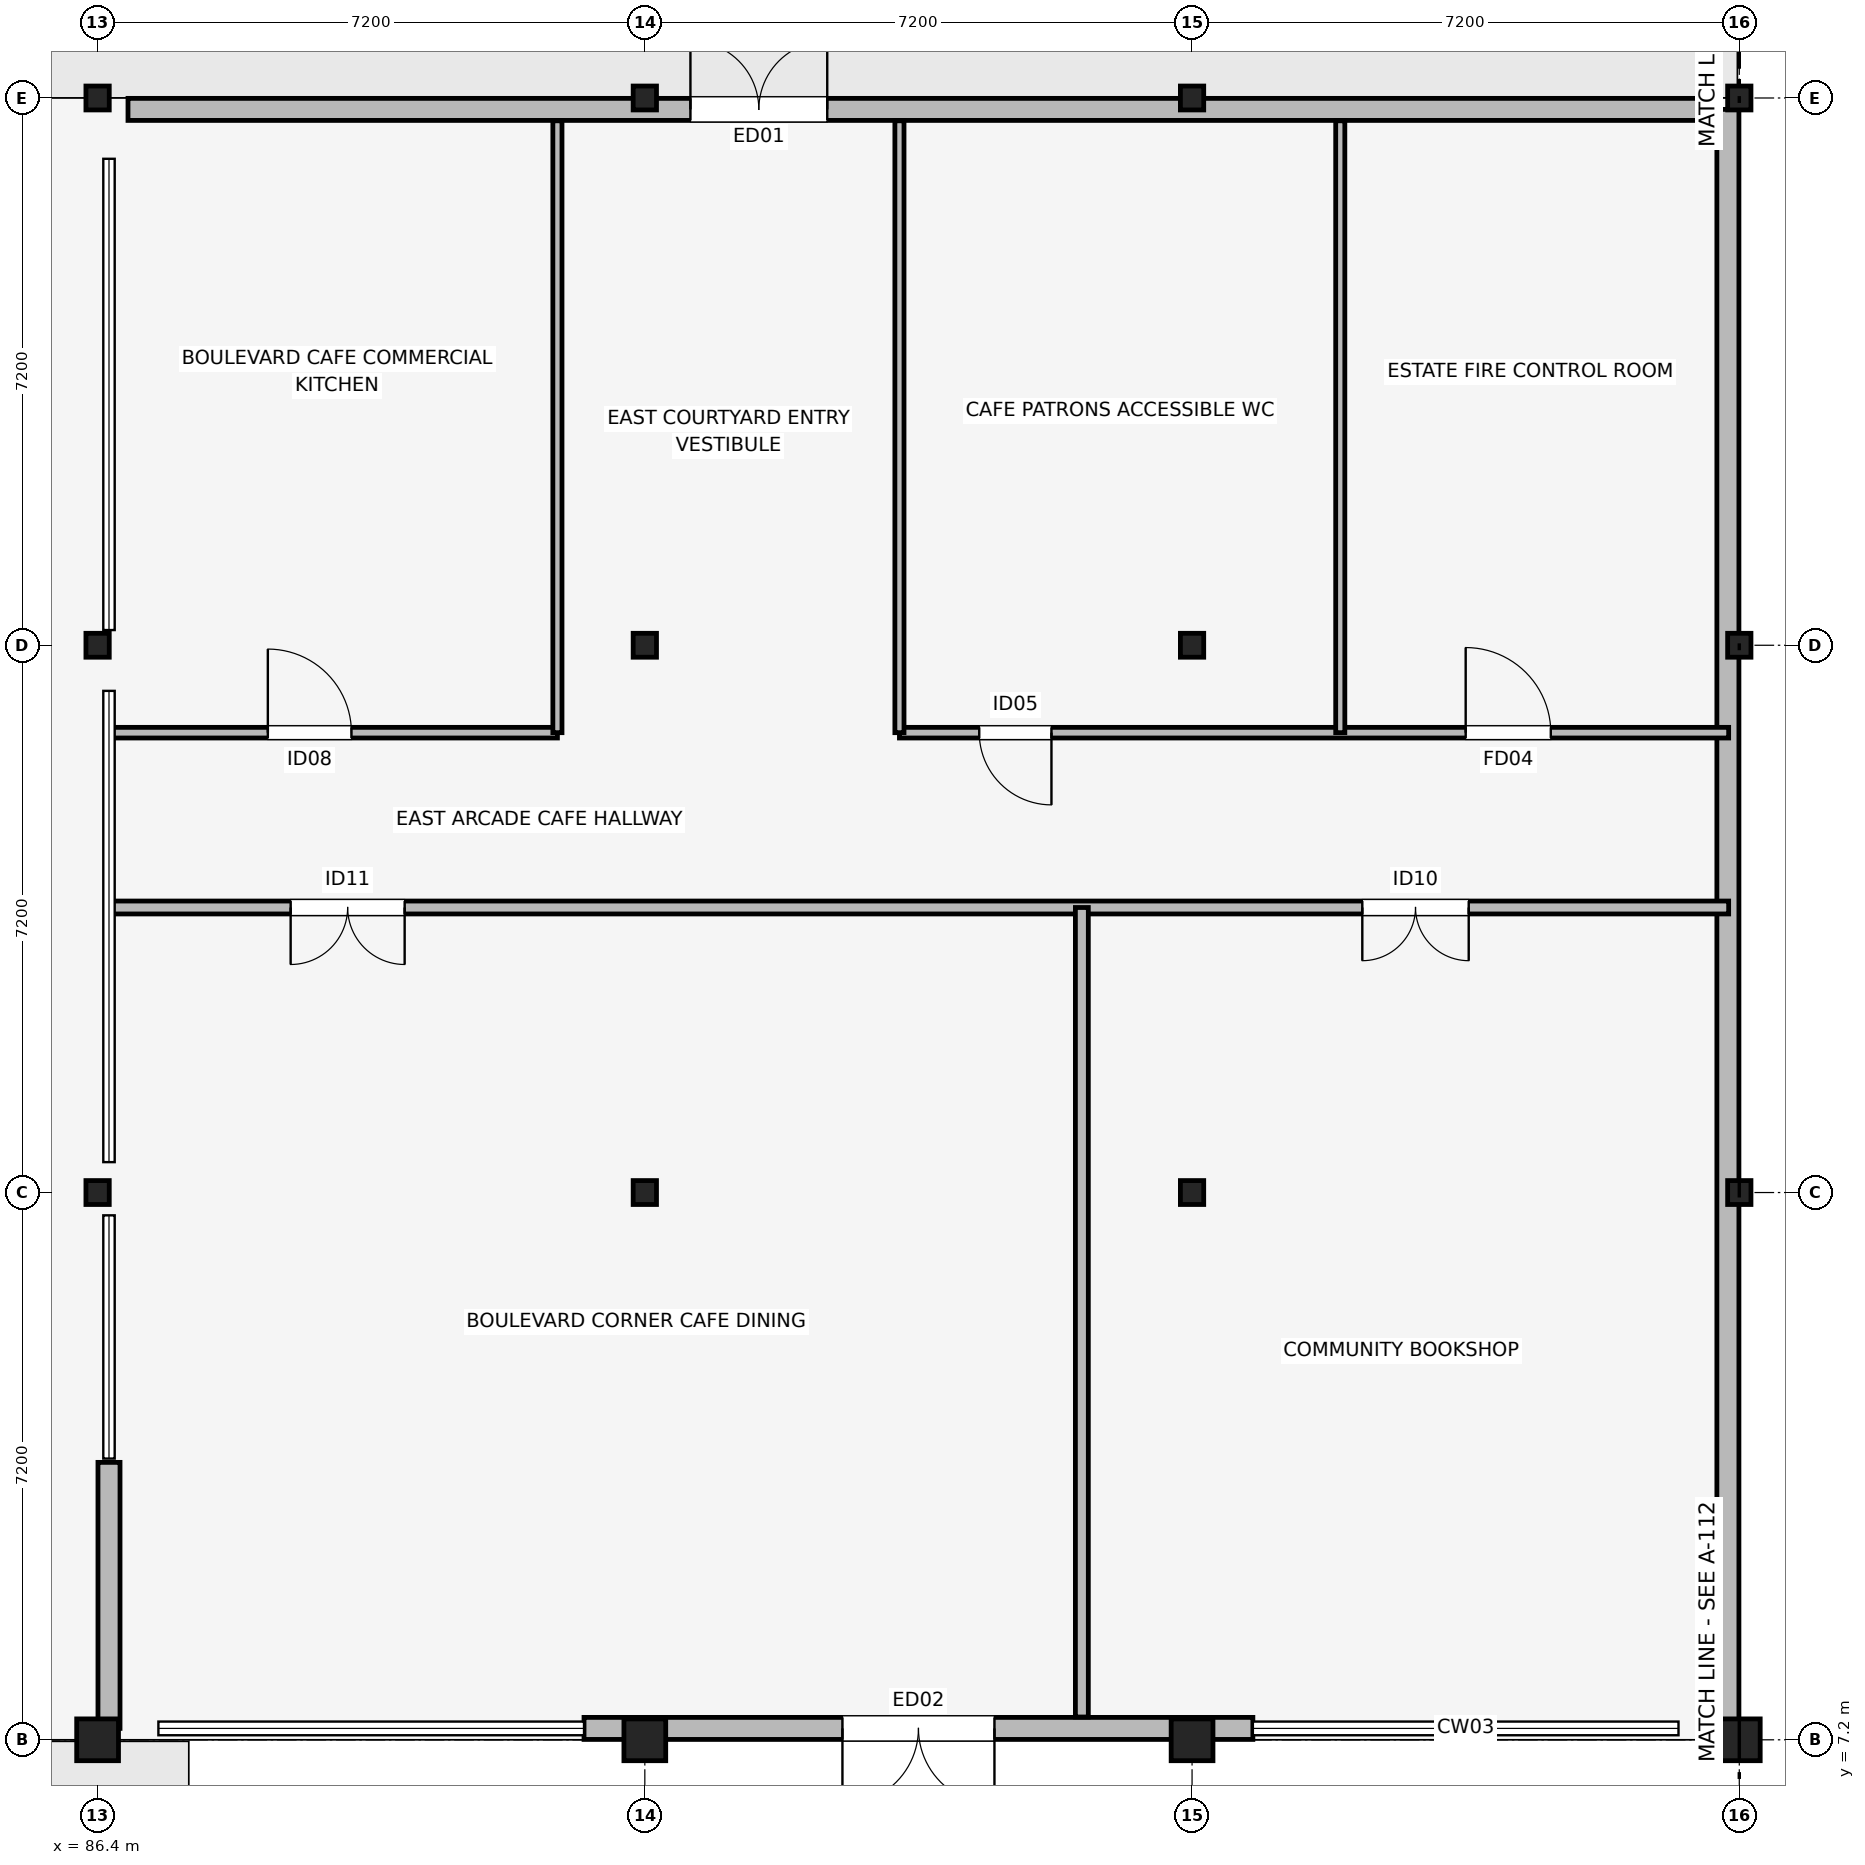
"""IFC4 building model, lengths in metres.
Left out: names, types, materials, properties, quantities, classifications, styles, units other than length and angle.
Written with IfcOpenShell. Run it as: python <this file> out.ifc"""

import sys

from ifc_helpers import new_model, si_unit, direction, frame, frame_2d, origin, origin_2d, place, context, subcontext, project, spatial, rectangle, circle, i_section, extrude, element, fill, save


model = new_model("IFC4")
c1 = context("Model", 3, precision=1e-05, world=origin(), true_north=direction((0.0, 1.0)))
c2 = subcontext(c1, "Body", "Model", "MODEL_VIEW")
j1 = project(units=[si_unit("LENGTHUNIT", "METRE"), si_unit("PLANEANGLEUNIT", "RADIAN")], contexts=[c1])
p1 = place(None, origin())
s1 = spatial("IfcSite", under=j1, at=p1, CompositionType="ELEMENT")
p2 = place(p1, origin())
s2 = spatial("IfcBuilding", under=s1, at=p2, CompositionType="ELEMENT")
p3 = place(p2, origin())
s3 = spatial("IfcBuildingStorey", under=s2, at=p3, CompositionType="ELEMENT", Elevation=0.0)
p4 = place(p3, frame((86.4, 7.2, 0.0), z_axis=(0.0, 0.0, 1.0), x_axis=(1.0, 0.0, 0.0)))
e1 = element("IfcColumn", 1, at=p4, inside=s3, PredefinedType="COLUMN", context=c2, shape_type="SweptSolid", body=[
    extrude(circle(Radius=0.275, at=origin_2d()), origin(), (0.0, 0.0, 1.0), 4.5),
])
for number, where, z_axis, x_axis in (
    (2, (86.4, 14.4, 0.0), (0.0, 0.0, 1.0), (1.0, 0.0, 0.0)),
    (3, (86.4, 21.6, 0.0), (0.0, 0.0, 1.0), (1.0, 0.0, 0.0)),
    (4, (86.4, 28.8, 0.0), (0.0, 0.0, 1.0), (1.0, 0.0, 0.0)),
):
    element("IfcColumn", number, at=place(p3, frame(where, z_axis=z_axis, x_axis=x_axis)), inside=s3, PredefinedType="COLUMN", context=c2, shape_type="SweptSolid", body=[
        extrude(i_section(OverallWidth=0.307, OverallDepth=0.315, WebThickness=0.012, FlangeThickness=0.019, FilletRadius=0.017, at=origin_2d()), origin(), (0.0, 0.0, 1.0), 4.5),
    ])
p5 = place(p3, frame((93.6, 7.2, 0.0), z_axis=(0.0, 0.0, 1.0), x_axis=(1.0, 0.0, 0.0)))
e5 = element("IfcColumn", 5, at=p5, inside=s3, PredefinedType="COLUMN", context=c2, shape_type="SweptSolid", body=[
    extrude(circle(Radius=0.275, at=origin_2d()), origin(), (0.0, 0.0, 1.0), 4.5),
])
for number, where, z_axis, x_axis in (
    (6, (93.6, 14.4, 0.0), (0.0, 0.0, 1.0), (1.0, 0.0, 0.0)),
    (7, (93.6, 21.6, 0.0), (0.0, 0.0, 1.0), (1.0, 0.0, 0.0)),
    (8, (93.6, 28.8, 0.0), (0.0, 0.0, 1.0), (1.0, 0.0, 0.0)),
):
    element("IfcColumn", number, at=place(p3, frame(where, z_axis=z_axis, x_axis=x_axis)), inside=s3, PredefinedType="COLUMN", context=c2, shape_type="SweptSolid", body=[
        extrude(i_section(OverallWidth=0.307, OverallDepth=0.315, WebThickness=0.012, FlangeThickness=0.019, FilletRadius=0.017, at=origin_2d()), origin(), (0.0, 0.0, 1.0), 4.5),
    ])
p6 = place(p3, frame((100.8, 7.2, 0.0), z_axis=(0.0, 0.0, 1.0), x_axis=(1.0, 0.0, 0.0)))
e9 = element("IfcColumn", 9, at=p6, inside=s3, PredefinedType="COLUMN", context=c2, shape_type="SweptSolid", body=[
    extrude(circle(Radius=0.275, at=origin_2d()), origin(), (0.0, 0.0, 1.0), 4.5),
])
for number, where, z_axis, x_axis in (
    (10, (100.8, 14.4, 0.0), (0.0, 0.0, 1.0), (1.0, 0.0, 0.0)),
    (11, (100.8, 21.6, 0.0), (0.0, 0.0, 1.0), (1.0, 0.0, 0.0)),
    (12, (100.8, 28.8, 0.0), (0.0, 0.0, 1.0), (1.0, 0.0, 0.0)),
):
    element("IfcColumn", number, at=place(p3, frame(where, z_axis=z_axis, x_axis=x_axis)), inside=s3, PredefinedType="COLUMN", context=c2, shape_type="SweptSolid", body=[
        extrude(i_section(OverallWidth=0.307, OverallDepth=0.315, WebThickness=0.012, FlangeThickness=0.019, FilletRadius=0.017, at=origin_2d()), origin(), (0.0, 0.0, 1.0), 4.5),
    ])
p7 = place(p3, frame((108.0, 7.2, 0.0), z_axis=(0.0, 0.0, 1.0), x_axis=(1.0, 0.0, 0.0)))
e13 = element("IfcColumn", 13, at=p7, inside=s3, PredefinedType="COLUMN", context=c2, shape_type="SweptSolid", body=[
    extrude(circle(Radius=0.275, at=origin_2d()), origin(), (0.0, 0.0, 1.0), 4.5),
])
for number, where, z_axis, x_axis in (
    (14, (108.0, 14.4, 0.0), (0.0, 0.0, 1.0), (1.0, 0.0, 0.0)),
    (15, (108.0, 21.6, 0.0), (0.0, 0.0, 1.0), (1.0, 0.0, 0.0)),
    (16, (108.0, 28.8, 0.0), (0.0, 0.0, 1.0), (1.0, 0.0, 0.0)),
):
    element("IfcColumn", number, at=place(p3, frame(where, z_axis=z_axis, x_axis=x_axis)), inside=s3, PredefinedType="COLUMN", context=c2, shape_type="SweptSolid", body=[
        extrude(i_section(OverallWidth=0.307, OverallDepth=0.315, WebThickness=0.012, FlangeThickness=0.019, FilletRadius=0.017, at=origin_2d()), origin(), (0.0, 0.0, 1.0), 4.5),
    ])
p8 = place(p3, frame((92.8, 7.35, 0.0), z_axis=(0.0, 0.0, 1.0), x_axis=(1.0, 0.0, 0.0)))
e17 = element("IfcWall", 17, at=p8, inside=s3, PredefinedType="SOLIDWALL", context=c2, shape_type="SweptSolid", body=[
    extrude(rectangle(XDim=8.8, YDim=0.29, at=frame_2d((4.4, 0.0))), origin(), (0.0, 0.0, 1.0), 2.752),
])
p9 = place(p8, frame((5.4, 0.0, 0.0), z_axis=(0.0, 0.0, 1.0), x_axis=(-1.0, 0.0, 0.0)))
e18 = element("IfcOpeningElement", 18, at=p9, cuts=e17, PredefinedType="OPENING", context=c2, shape_type="SweptSolid", body=[
    extrude(rectangle(XDim=2.0, YDim=2.5, at=frame_2d((1.0, 1.25))), frame((0.0, 0.155, 0.0), z_axis=(0.0, -1.0, 0.0), x_axis=(1.0, 0.0, 0.0)), (0.0, 0.0, 1.0), 0.31),
])
p10 = place(p3, frame((86.8, 28.65, 0.0), z_axis=(0.0, 0.0, 1.0), x_axis=(1.0, 0.0, 0.0)))
e19 = element("IfcWall", 19, at=p10, inside=s3, PredefinedType="SOLIDWALL", context=c2, shape_type="SweptSolid", body=[
    extrude(rectangle(XDim=20.8, YDim=0.29, at=frame_2d((10.4, 0.0))), origin(), (0.0, 0.0, 1.0), 3.701),
])
p11 = place(p10, frame((7.4, 0.0, 0.0)))
e20 = element("IfcOpeningElement", 20, at=p11, cuts=e19, PredefinedType="OPENING", context=c2, shape_type="SweptSolid", body=[
    extrude(rectangle(XDim=1.8, YDim=2.4, at=frame_2d((0.9, 1.2))), frame((0.0, 0.155, 0.0), z_axis=(0.0, -1.0, 0.0), x_axis=(1.0, 0.0, 0.0)), (0.0, 0.0, 1.0), 0.31),
])
p12 = place(p3, frame((107.85, 7.35, 0.0), z_axis=(0.0, 0.0, 1.0), x_axis=(0.0, 1.0, 0.0)))
e21 = element("IfcWall", 21, at=p12, inside=s3, PredefinedType="SOLIDWALL", context=c2, shape_type="SweptSolid", body=[
    extrude(rectangle(XDim=21.3, YDim=0.29, at=frame_2d((10.65, 0.0))), origin(), (0.0, 0.0, 1.0), 2.752),
])
p13 = place(p3, frame((86.55, 7.35, 0.0), z_axis=(0.0, 0.0, 1.0), x_axis=(0.0, 1.0, 0.0)))
e22 = element("IfcWall", 22, at=p13, inside=s3, PredefinedType="SOLIDWALL", context=c2, shape_type="SweptSolid", body=[
    extrude(rectangle(XDim=3.5, YDim=0.29, at=frame_2d((1.75, 0.0))), origin(), (0.0, 0.0, 1.0), 2.752),
])
p14 = place(p3, frame((86.54, 18.15, 0.0), z_axis=(0.0, 0.0, 1.0), x_axis=(1.0, 0.0, 0.0)))
e23 = element("IfcWall", 23, at=p14, inside=s3, PredefinedType="PARTITIONING", context=c2, shape_type="SweptSolid", body=[
    extrude(rectangle(XDim=21.32, YDim=0.17, at=frame_2d((10.66, 0.0))), origin(), (0.0, 0.0, 1.0), 3.5),
])
p15 = place(p14, frame((3.9, 0.0, 0.0), z_axis=(0.0, 0.0, 1.0), x_axis=(-1.0, 0.0, 0.0)))
e24 = element("IfcOpeningElement", 24, at=p15, cuts=e23, PredefinedType="OPENING", context=c2, shape_type="SweptSolid", body=[
    extrude(rectangle(XDim=1.5, YDim=2.28, at=frame_2d((0.75, 1.14))), frame((0.0, 0.095, 0.0), z_axis=(0.0, -1.0, 0.0), x_axis=(1.0, 0.0, 0.0)), (0.0, 0.0, 1.0), 0.19),
])
p16 = place(p14, frame((17.9, 0.0, 0.0), z_axis=(0.0, 0.0, 1.0), x_axis=(-1.0, 0.0, 0.0)))
e25 = element("IfcOpeningElement", 25, at=p16, cuts=e23, PredefinedType="OPENING", context=c2, shape_type="SweptSolid", body=[
    extrude(rectangle(XDim=1.4, YDim=2.22, at=frame_2d((0.7, 1.11))), frame((0.0, 0.095, 0.0), z_axis=(0.0, -1.0, 0.0), x_axis=(1.0, 0.0, 0.0)), (0.0, 0.0, 1.0), 0.19),
])
p17 = place(p3, frame((99.35, 7.5, 0.0), z_axis=(0.0, 0.0, 1.0), x_axis=(0.0, 1.0, 0.0)))
e26 = element("IfcWall", 26, at=p17, inside=s3, PredefinedType="PARTITIONING", context=c2, shape_type="SweptSolid", body=[
    extrude(rectangle(XDim=10.65, YDim=0.17, at=frame_2d((5.325, 0.0))), origin(), (0.0, 0.0, 1.0), 3.5),
])
p18 = place(p3, frame((86.54, 20.45, 0.0), z_axis=(0.0, 0.0, 1.0), x_axis=(1.0, 0.0, 0.0)))
e27 = element("IfcWall", 27, at=p18, inside=s3, PredefinedType="PARTITIONING", context=c2, shape_type="SweptSolid", body=[
    extrude(rectangle(XDim=5.91, YDim=0.14, at=frame_2d((2.955, 0.0))), origin(), (0.0, 0.0, 1.0), 3.5),
])
p19 = place(p18, frame((2.1, 0.0, 0.0)))
e28 = element("IfcOpeningElement", 28, at=p19, cuts=e27, PredefinedType="OPENING", context=c2, shape_type="SweptSolid", body=[
    extrude(rectangle(XDim=1.1, YDim=2.15, at=frame_2d((0.55, 1.075))), frame((0.0, 0.08, 0.0), z_axis=(0.0, -1.0, 0.0), x_axis=(1.0, 0.0, 0.0)), (0.0, 0.0, 1.0), 0.16),
])
p20 = place(p3, frame((96.95, 20.45, 0.0), z_axis=(0.0, 0.0, 1.0), x_axis=(1.0, 0.0, 0.0)))
e29 = element("IfcWall", 29, at=p20, inside=s3, PredefinedType="PARTITIONING", context=c2, shape_type="SweptSolid", body=[
    extrude(rectangle(XDim=10.91, YDim=0.14, at=frame_2d((5.455, 0.0))), origin(), (0.0, 0.0, 1.0), 3.5),
])
p21 = place(p20, frame((2.0, 0.0, 0.0), z_axis=(0.0, 0.0, 1.0), x_axis=(-1.0, 0.0, 0.0)))
e30 = element("IfcOpeningElement", 30, at=p21, cuts=e29, PredefinedType="OPENING", context=c2, shape_type="SweptSolid", body=[
    extrude(rectangle(XDim=0.95, YDim=2.12, at=frame_2d((0.475, 1.06))), frame((0.0, 0.08, 0.0), z_axis=(0.0, -1.0, 0.0), x_axis=(1.0, 0.0, 0.0)), (0.0, 0.0, 1.0), 0.16),
])
p22 = place(p20, frame((7.45, 0.0, 0.0)))
e31 = element("IfcOpeningElement", 31, at=p22, cuts=e29, PredefinedType="OPENING", context=c2, shape_type="SweptSolid", body=[
    extrude(rectangle(XDim=1.12, YDim=2.15, at=frame_2d((0.56, 1.075))), frame((0.0, 0.08, 0.0), z_axis=(0.0, -1.0, 0.0), x_axis=(1.0, 0.0, 0.0)), (0.0, 0.0, 1.0), 0.16),
])
for number, where, z_axis, x_axis in (
    (32, (92.45, 20.45, 0.0), (0.0, 0.0, 1.0), (0.0, 1.0, 0.0)),
    (33, (96.95, 20.45, 0.0), (0.0, 0.0, 1.0), (0.0, 1.0, 0.0)),
    (34, (102.75, 20.45, 0.0), (0.0, 0.0, 1.0), (0.0, 1.0, 0.0)),
):
    element("IfcWall", number, at=place(p3, frame(where, z_axis=z_axis, x_axis=x_axis)), inside=s3, PredefinedType="PARTITIONING", context=c2, shape_type="SweptSolid", body=[
        extrude(rectangle(XDim=8.05, YDim=0.12, at=frame_2d((4.025, 0.0))), origin(), (0.0, 0.0, 1.0), 3.5),
    ])
p23 = place(p9, origin())
e35 = element("IfcDoor", 35, at=p23, inside=s3, OperationType="DOUBLE_DOOR_SINGLE_SWING", PredefinedType="DOOR", context=c2, shape_type="SweptSolid", body=[
    extrude(rectangle(XDim=2.0, YDim=2.5, at=frame_2d((1.0, 1.25))), frame((0.0, 0.025, 0.0), z_axis=(0.0, -1.0, 0.0), x_axis=(1.0, 0.0, 0.0)), (0.0, 0.0, 1.0), 0.05),
])
fill(e18, e35)
p24 = place(p11, origin())
e36 = element("IfcDoor", 36, at=p24, inside=s3, OperationType="DOUBLE_DOOR_SINGLE_SWING", PredefinedType="DOOR", context=c2, shape_type="SweptSolid", body=[
    extrude(rectangle(XDim=1.8, YDim=2.4, at=frame_2d((0.9, 1.2))), frame((0.0, 0.025, 0.0), z_axis=(0.0, -1.0, 0.0), x_axis=(1.0, 0.0, 0.0)), (0.0, 0.0, 1.0), 0.05),
])
fill(e20, e36)
p25 = place(p15, origin())
e37 = element("IfcDoor", 37, at=p25, inside=s3, OperationType="DOUBLE_DOOR_SINGLE_SWING", PredefinedType="DOOR", context=c2, shape_type="SweptSolid", body=[
    extrude(rectangle(XDim=1.5, YDim=2.28, at=frame_2d((0.75, 1.14))), frame((0.0, 0.025, 0.0), z_axis=(0.0, -1.0, 0.0), x_axis=(1.0, 0.0, 0.0)), (0.0, 0.0, 1.0), 0.05),
])
fill(e24, e37)
p26 = place(p16, origin())
e38 = element("IfcDoor", 38, at=p26, inside=s3, OperationType="DOUBLE_DOOR_SINGLE_SWING", PredefinedType="DOOR", context=c2, shape_type="SweptSolid", body=[
    extrude(rectangle(XDim=1.4, YDim=2.22, at=frame_2d((0.7, 1.11))), frame((0.0, 0.025, 0.0), z_axis=(0.0, -1.0, 0.0), x_axis=(1.0, 0.0, 0.0)), (0.0, 0.0, 1.0), 0.05),
])
fill(e25, e38)
p27 = place(p19, origin())
e39 = element("IfcDoor", 39, at=p27, inside=s3, OperationType="SINGLE_SWING_LEFT", PredefinedType="DOOR", context=c2, shape_type="SweptSolid", body=[
    extrude(rectangle(XDim=1.1, YDim=2.15, at=frame_2d((0.55, 1.075))), frame((0.0, 0.025, 0.0), z_axis=(0.0, -1.0, 0.0), x_axis=(1.0, 0.0, 0.0)), (0.0, 0.0, 1.0), 0.05),
])
fill(e28, e39)
p28 = place(p21, origin())
e40 = element("IfcDoor", 40, at=p28, inside=s3, OperationType="SINGLE_SWING_RIGHT", PredefinedType="DOOR", context=c2, shape_type="SweptSolid", body=[
    extrude(rectangle(XDim=0.95, YDim=2.12, at=frame_2d((0.475, 1.06))), frame((0.0, 0.025, 0.0), z_axis=(0.0, -1.0, 0.0), x_axis=(1.0, 0.0, 0.0)), (0.0, 0.0, 1.0), 0.05),
])
fill(e30, e40)
p29 = place(p22, origin())
e41 = element("IfcDoor", 41, at=p29, inside=s3, OperationType="SINGLE_SWING_LEFT", PredefinedType="DOOR", context=c2, shape_type="SweptSolid", body=[
    extrude(rectangle(XDim=1.12, YDim=2.15, at=frame_2d((0.56, 1.075))), frame((0.0, 0.025, 0.0), z_axis=(0.0, -1.0, 0.0), x_axis=(1.0, 0.0, 0.0)), (0.0, 0.0, 1.0), 0.05),
])
fill(e31, e41)
save(model, sys.argv[1])
